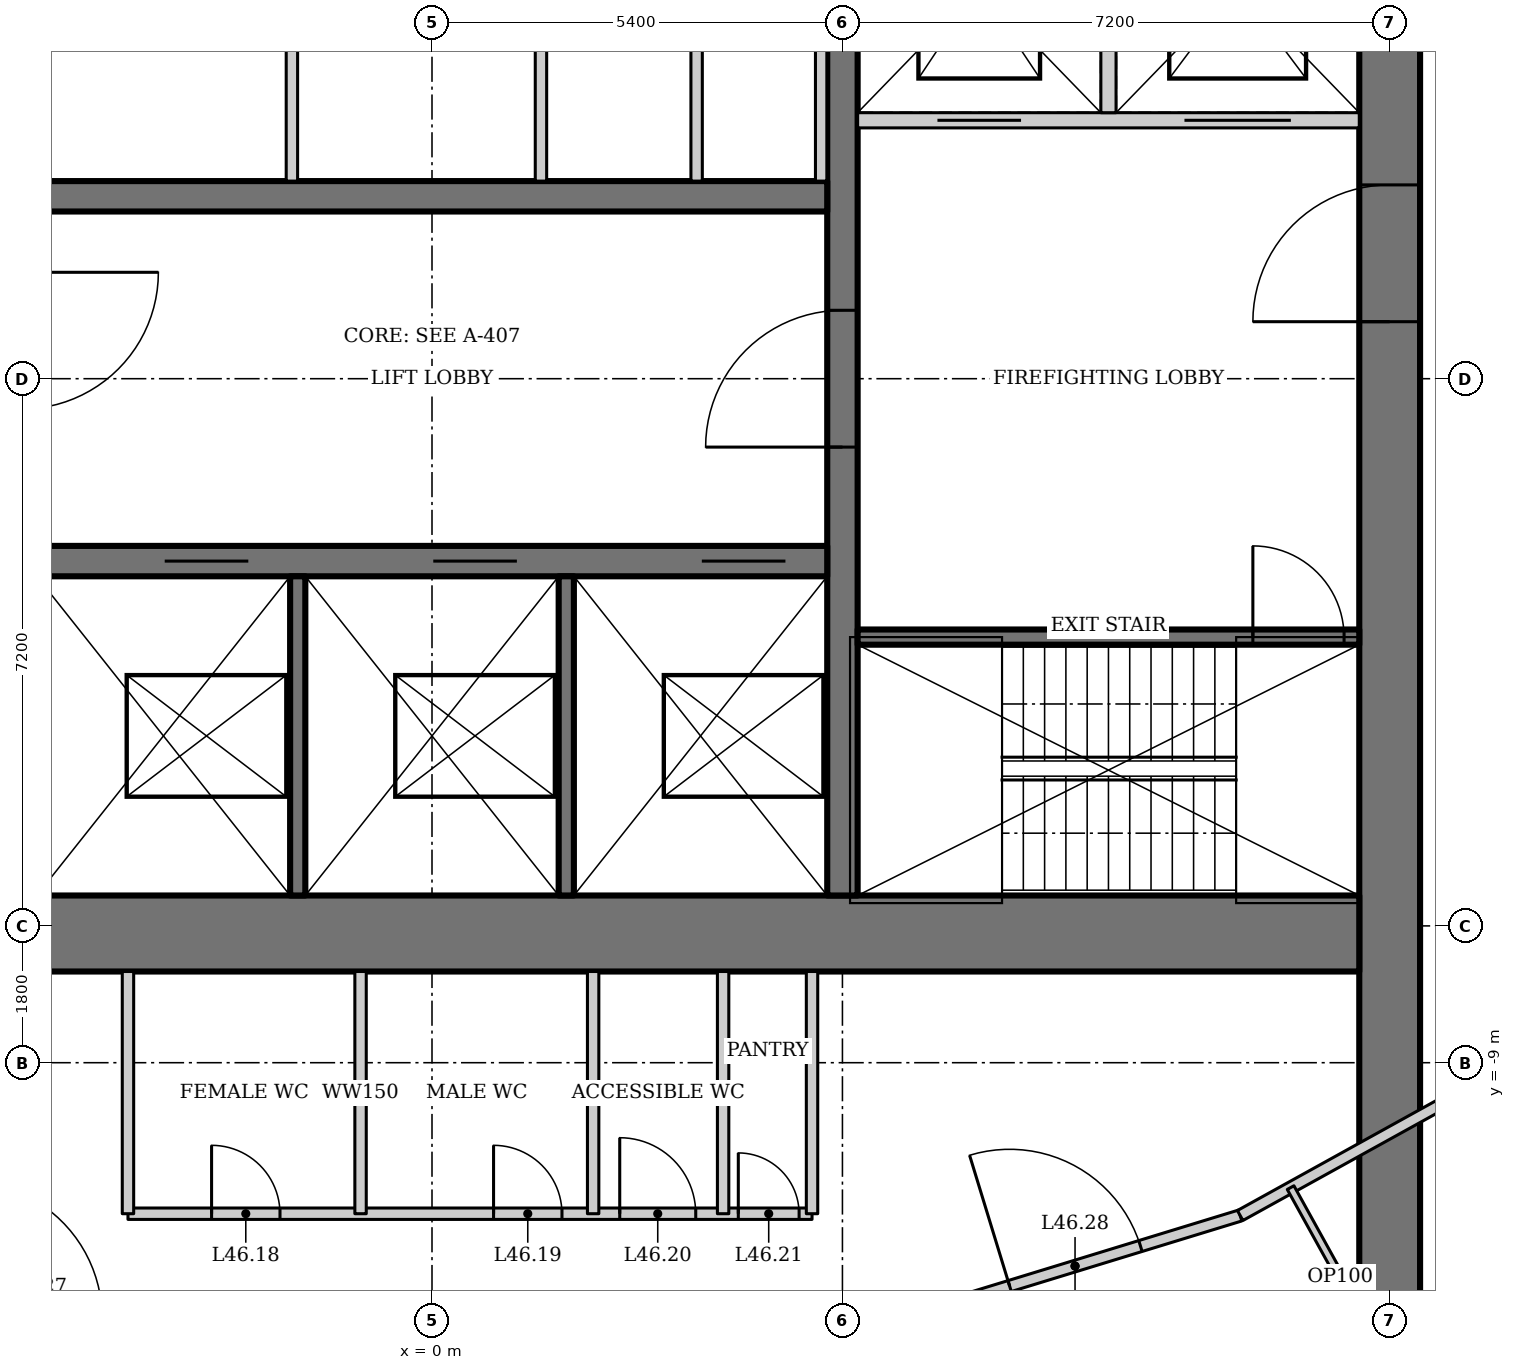
"""IFC4 building model, lengths in metres.
Left out: names, types, materials, properties, quantities, classifications, styles, units other than length and angle.
Written with IfcOpenShell. Run it as: python <this file> out.ifc"""

import sys

from ifc_helpers import new_model, si_unit, direction, frame, frame_2d, origin, place, context, subcontext, project, spatial, rectangle, extrude, element, fill, save


model = new_model("IFC4")
c1 = context("Model", 3, precision=1e-05, world=origin(), true_north=direction((0.0, 1.0)))
c2 = subcontext(c1, "Body", "Model", "MODEL_VIEW")
j1 = project(units=[si_unit("LENGTHUNIT", "METRE"), si_unit("PLANEANGLEUNIT", "RADIAN")], contexts=[c1])
p1 = place(None, origin())
s1 = spatial("IfcSite", under=j1, at=p1, CompositionType="ELEMENT")
p2 = place(p1, origin())
s2 = spatial("IfcBuilding", under=s1, at=p2, CompositionType="ELEMENT")
p3 = place(p2, frame((0.0, 0.0, 199.0)))
s3 = spatial("IfcBuildingStorey", under=s2, at=p3, CompositionType="ELEMENT", Elevation=199.0)
p4 = place(p3, frame((12.6, -13.0, 0.0), z_axis=(0.0, 0.0, 1.0), x_axis=(0.0, 1.0, 0.0)))
e1 = element("IfcWall", 1, at=p4, inside=s3, PredefinedType="SHEAR", context=c2, shape_type="SweptSolid", body=[
    extrude(rectangle(XDim=26.0, YDim=0.8, at=frame_2d((13.0, 0.0))), origin(), (0.0, 0.0, 1.0), 4.2),
])
p5 = place(p4, frame((13.75, 0.0, 0.0)))
e2 = element("IfcOpeningElement", 2, at=p5, cuts=e1, PredefinedType="OPENING", context=c2, shape_type="SweptSolid", body=[
    extrude(rectangle(XDim=1.8, YDim=2.1, at=frame_2d((0.9, 1.05))), frame((0.0, 0.41, 0.0), z_axis=(0.0, -1.0, 0.0), x_axis=(1.0, 0.0, 0.0)), (0.0, 0.0, 1.0), 0.82),
])
p6 = place(p3, frame((-12.2, -7.3, 0.0), z_axis=(0.0, 0.0, 1.0), x_axis=(1.0, 0.0, 0.0)))
e3 = element("IfcWall", 3, at=p6, inside=s3, PredefinedType="SHEAR", context=c2, shape_type="SweptSolid", body=[
    extrude(rectangle(XDim=24.4, YDim=1.0, at=frame_2d((12.2, 0.0))), origin(), (0.0, 0.0, 1.0), 4.2),
])
p7 = place(p3, frame((5.4, -6.8, 0.0), z_axis=(0.0, 0.0, 1.0), x_axis=(0.0, 1.0, 0.0)))
e4 = element("IfcWall", 4, at=p7, inside=s3, PredefinedType="SHEAR", context=c2, shape_type="SweptSolid", body=[
    extrude(rectangle(XDim=14.6, YDim=0.4, at=frame_2d((7.3, 0.0))), origin(), (0.0, 0.0, 1.0), 4.2),
])
p8 = place(p7, frame((5.9, 0.0, 0.0)))
e5 = element("IfcOpeningElement", 5, at=p8, cuts=e4, PredefinedType="OPENING", context=c2, shape_type="SweptSolid", body=[
    extrude(rectangle(XDim=1.8, YDim=2.1, at=frame_2d((0.9, 1.05))), frame((0.0, 0.21, 0.0), z_axis=(0.0, -1.0, 0.0), x_axis=(1.0, 0.0, 0.0)), (0.0, 0.0, 1.0), 0.42),
])
p9 = place(p3, frame((-5.2, -2.4, 0.0), z_axis=(0.0, 0.0, 1.0), x_axis=(1.0, 0.0, 0.0)))
e6 = element("IfcWall", 6, at=p9, inside=s3, PredefinedType="SHEAR", context=c2, shape_type="SweptSolid", body=[
    extrude(rectangle(XDim=10.4, YDim=0.4, at=frame_2d((5.2, 0.0))), origin(), (0.0, 0.0, 1.0), 4.2),
])
p10 = place(p9, frame((1.683, 0.0, 0.0)))
e7 = element("IfcOpeningElement", 7, at=p10, cuts=e6, PredefinedType="OPENING", context=c2, shape_type="SweptSolid", body=[
    extrude(rectangle(XDim=1.1, YDim=2.2, at=frame_2d((0.55, 1.1))), frame((0.0, 0.21, 0.0), z_axis=(0.0, -1.0, 0.0), x_axis=(1.0, 0.0, 0.0)), (0.0, 0.0, 1.0), 0.42),
])
p11 = place(p9, frame((5.217, 0.0, 0.0)))
e8 = element("IfcOpeningElement", 8, at=p11, cuts=e6, PredefinedType="OPENING", context=c2, shape_type="SweptSolid", body=[
    extrude(rectangle(XDim=1.1, YDim=2.2, at=frame_2d((0.55, 1.1))), frame((0.0, 0.21, 0.0), z_axis=(0.0, -1.0, 0.0), x_axis=(1.0, 0.0, 0.0)), (0.0, 0.0, 1.0), 0.42),
])
p12 = place(p9, frame((8.75, 0.0, 0.0)))
e9 = element("IfcOpeningElement", 9, at=p12, cuts=e6, PredefinedType="OPENING", context=c2, shape_type="SweptSolid", body=[
    extrude(rectangle(XDim=1.1, YDim=2.2, at=frame_2d((0.55, 1.1))), frame((0.0, 0.21, 0.0), z_axis=(0.0, -1.0, 0.0), x_axis=(1.0, 0.0, 0.0)), (0.0, 0.0, 1.0), 0.42),
])
for number, where, z_axis, x_axis in (
    (10, (-1.767, -2.6, 0.0), (0.0, 0.0, 1.0), (0.0, -1.0, 0.0)),
    (11, (1.767, -2.6, 0.0), (0.0, 0.0, 1.0), (0.0, -1.0, 0.0)),
):
    element("IfcWall", number, at=place(p3, frame(where, z_axis=z_axis, x_axis=x_axis)), inside=s3, PredefinedType="SOLIDWALL", context=c2, shape_type="SweptSolid", body=[
        extrude(rectangle(XDim=4.2, YDim=0.2, at=frame_2d((2.1, 0.0))), origin(), (0.0, 0.0, 1.0), 4.2),
    ])
p13 = place(p3, frame((5.2, 2.4, 0.0), z_axis=(0.0, 0.0, 1.0), x_axis=(-1.0, 0.0, 0.0)))
e12 = element("IfcWall", 12, at=p13, inside=s3, PredefinedType="SHEAR", context=c2, shape_type="SweptSolid", body=[
    extrude(rectangle(XDim=10.4, YDim=0.4, at=frame_2d((5.2, 0.0))), origin(), (0.0, 0.0, 1.0), 4.2),
])
p14 = place(p3, frame((5.6, -3.4, 0.0), z_axis=(0.0, 0.0, 1.0), x_axis=(1.0, 0.0, 0.0)))
e13 = element("IfcWall", 13, at=p14, inside=s3, PredefinedType="SHEAR", context=c2, shape_type="SweptSolid", body=[
    extrude(rectangle(XDim=6.6, YDim=0.2, at=frame_2d((3.3, 0.0))), origin(), (0.0, 0.0, 1.0), 4.2),
])
p15 = place(p14, frame((5.2, 0.0, 0.0)))
e14 = element("IfcOpeningElement", 14, at=p15, cuts=e13, PredefinedType="OPENING", context=c2, shape_type="SweptSolid", body=[
    extrude(rectangle(XDim=1.2, YDim=2.1, at=frame_2d((0.6, 1.05))), frame((0.0, 0.11, 0.0), z_axis=(0.0, -1.0, 0.0), x_axis=(1.0, 0.0, 0.0)), (0.0, 0.0, 1.0), 0.22),
])
p16 = place(p3, frame((12.2, 3.4, 0.0), z_axis=(0.0, 0.0, 1.0), x_axis=(-1.0, 0.0, 0.0)))
e15 = element("IfcWall", 15, at=p16, inside=s3, PredefinedType="SOLIDWALL", context=c2, shape_type="SweptSolid", body=[
    extrude(rectangle(XDim=6.6, YDim=0.2, at=frame_2d((3.3, 0.0))), origin(), (0.0, 0.0, 1.0), 4.2),
])
p17 = place(p16, frame((4.45, 0.0, 0.0)))
e16 = element("IfcOpeningElement", 16, at=p17, cuts=e15, PredefinedType="OPENING", context=c2, shape_type="SweptSolid", body=[
    extrude(rectangle(XDim=1.1, YDim=2.2, at=frame_2d((0.55, 1.1))), frame((0.0, 0.11, 0.0), z_axis=(0.0, -1.0, 0.0), x_axis=(1.0, 0.0, 0.0)), (0.0, 0.0, 1.0), 0.22),
])
p18 = place(p16, frame((0.9, 0.0, 0.0)))
e17 = element("IfcOpeningElement", 17, at=p18, cuts=e15, PredefinedType="OPENING", context=c2, shape_type="SweptSolid", body=[
    extrude(rectangle(XDim=1.4, YDim=2.2, at=frame_2d((0.7, 1.1))), frame((0.0, 0.11, 0.0), z_axis=(0.0, -1.0, 0.0), x_axis=(1.0, 0.0, 0.0)), (0.0, 0.0, 1.0), 0.22),
])
p19 = place(p3, frame((8.9, 3.5, 0.0), z_axis=(0.0, 0.0, 1.0), x_axis=(0.0, 1.0, 0.0)))
e18 = element("IfcWall", 18, at=p19, inside=s3, PredefinedType="SOLIDWALL", context=c2, shape_type="SweptSolid", body=[
    extrude(rectangle(XDim=3.3, YDim=0.2, at=frame_2d((1.65, 0.0))), origin(), (0.0, 0.0, 1.0), 4.2),
])
p20 = place(p3, frame((6.288, -12.341, 0.0), z_axis=(0.0, 0.0, 1.0), x_axis=(0.956185837153, 0.292760388079, 0.0)))
e19 = element("IfcWall", 19, at=p20, inside=s3, PredefinedType="PARTITIONING", context=c2, shape_type="SweptSolid", body=[
    extrude(rectangle(XDim=4.544, YDim=0.15, at=frame_2d((2.272, 0.0))), origin(), (0.0, 0.0, 1.0), 4.05),
])
p21 = place(p20, frame((1.372, 0.0, 0.0)))
e20 = element("IfcOpeningElement", 20, at=p21, cuts=e19, PredefinedType="OPENING", context=c2, shape_type="SweptSolid", body=[
    extrude(rectangle(XDim=1.8, YDim=2.1, at=frame_2d((0.9, 1.05))), frame((0.0, 0.085, 0.0), z_axis=(0.0, -1.0, 0.0), x_axis=(1.0, 0.0, 0.0)), (0.0, 0.0, 1.0), 0.17),
])
p22 = place(p3, frame((10.633, -11.01, 0.0), z_axis=(0.0, 0.0, 1.0), x_axis=(0.875044572696, 0.484042349176, 0.0)))
e21 = element("IfcWall", 21, at=p22, inside=s3, PredefinedType="PARTITIONING", context=c2, shape_type="SweptSolid", body=[
    extrude(rectangle(XDim=5.015, YDim=0.15, at=frame_2d((2.507, 0.0))), origin(), (0.0, 0.0, 1.0), 4.05),
])
for number, where, z_axis, x_axis in (
    (22, (5.12, 2.6, 0.0), (0.0, 0.0, 1.0), (0.0, 1.0, 0.0)),
    (23, (-1.843, 2.6, 0.0), (0.0, 0.0, 1.0), (0.0, 1.0, 0.0)),
):
    element("IfcWall", number, at=place(p3, frame(where, z_axis=z_axis, x_axis=x_axis)), inside=s3, PredefinedType="SOLIDWALL", context=c2, shape_type="SweptSolid", body=[
        extrude(rectangle(XDim=4.4, YDim=0.15, at=frame_2d((2.2, 0.0))), origin(), (0.0, 0.0, 1.0), 4.05),
    ])
p23 = place(p3, frame((1.434, 2.6, 0.0), z_axis=(0.0, 0.0, 1.0), x_axis=(0.0, 1.0, 0.0)))
e24 = element("IfcWall", 24, at=p23, inside=s3, PredefinedType="SOLIDWALL", context=c2, shape_type="SweptSolid", body=[
    extrude(rectangle(XDim=4.4, YDim=0.15, at=frame_2d((2.2, 0.0))), origin(), (0.0, 0.0, 1.0), 3.108),
])
p24 = place(p3, frame((3.482, 2.6, 0.0), z_axis=(0.0, 0.0, 1.0), x_axis=(0.0, 1.0, 0.0)))
e25 = element("IfcWall", 25, at=p24, inside=s3, PredefinedType="SOLIDWALL", context=c2, shape_type="SweptSolid", body=[
    extrude(rectangle(XDim=4.4, YDim=0.15, at=frame_2d((2.2, 0.0))), origin(), (0.0, 0.0, 1.0), 4.05),
])
p25 = place(p3, frame((-4.0, -10.987, 0.0), z_axis=(0.0, 0.0, 1.0), x_axis=(1.0, 0.0, 0.0)))
e26 = element("IfcWall", 26, at=p25, inside=s3, PredefinedType="SOLIDWALL", context=c2, shape_type="SweptSolid", body=[
    extrude(rectangle(XDim=9.0, YDim=0.15, at=frame_2d((4.5, 0.0))), origin(), (0.0, 0.0, 1.0), 4.05),
])
p26 = place(p25, frame((1.1, 0.0, 0.0)))
e27 = element("IfcOpeningElement", 27, at=p26, cuts=e26, PredefinedType="OPENING", context=c2, shape_type="SweptSolid", body=[
    extrude(rectangle(XDim=0.9, YDim=2.1, at=frame_2d((0.45, 1.05))), frame((0.0, 0.085, 0.0), z_axis=(0.0, -1.0, 0.0), x_axis=(1.0, 0.0, 0.0)), (0.0, 0.0, 1.0), 0.17),
])
p27 = place(p25, frame((4.81, 0.0, 0.0)))
e28 = element("IfcOpeningElement", 28, at=p27, cuts=e26, PredefinedType="OPENING", context=c2, shape_type="SweptSolid", body=[
    extrude(rectangle(XDim=0.9, YDim=2.1, at=frame_2d((0.45, 1.05))), frame((0.0, 0.085, 0.0), z_axis=(0.0, -1.0, 0.0), x_axis=(1.0, 0.0, 0.0)), (0.0, 0.0, 1.0), 0.17),
])
p28 = place(p25, frame((6.47, 0.0, 0.0)))
e29 = element("IfcOpeningElement", 29, at=p28, cuts=e26, PredefinedType="OPENING", context=c2, shape_type="SweptSolid", body=[
    extrude(rectangle(XDim=1.0, YDim=2.1, at=frame_2d((0.5, 1.05))), frame((0.0, 0.085, 0.0), z_axis=(0.0, -1.0, 0.0), x_axis=(1.0, 0.0, 0.0)), (0.0, 0.0, 1.0), 0.17),
])
p29 = place(p25, frame((8.03, 0.0, 0.0)))
e30 = element("IfcOpeningElement", 30, at=p29, cuts=e26, PredefinedType="OPENING", context=c2, shape_type="SweptSolid", body=[
    extrude(rectangle(XDim=0.8, YDim=2.1, at=frame_2d((0.4, 1.05))), frame((0.0, 0.085, 0.0), z_axis=(0.0, -1.0, 0.0), x_axis=(1.0, 0.0, 0.0)), (0.0, 0.0, 1.0), 0.17),
])
for number, where, z_axis, x_axis in (
    (31, (-4.0, -7.8, 0.0), (0.0, 0.0, 1.0), (0.0, -1.0, 0.0)),
    (32, (5.0, -7.8, 0.0), (0.0, 0.0, 1.0), (0.0, -1.0, 0.0)),
    (33, (-0.94, -7.8, 0.0), (0.0, 0.0, 1.0), (0.0, -1.0, 0.0)),
):
    element("IfcWall", number, at=place(p3, frame(where, z_axis=z_axis, x_axis=x_axis)), inside=s3, PredefinedType="SOLIDWALL", context=c2, shape_type="SweptSolid", body=[
        extrude(rectangle(XDim=3.187, YDim=0.15, at=frame_2d((1.594, 0.0))), origin(), (0.0, 0.0, 1.0), 4.05),
    ])
p30 = place(p3, frame((2.12, -7.8, 0.0), z_axis=(0.0, 0.0, 1.0), x_axis=(0.0, -1.0, 0.0)))
e34 = element("IfcWall", 34, at=p30, inside=s3, PredefinedType="SOLIDWALL", context=c2, shape_type="SweptSolid", body=[
    extrude(rectangle(XDim=3.187, YDim=0.15, at=frame_2d((1.594, 0.0))), origin(), (0.0, 0.0, 1.0), 3.293),
])
p31 = place(p3, frame((3.83, -7.8, 0.0), z_axis=(0.0, 0.0, 1.0), x_axis=(0.0, -1.0, 0.0)))
e35 = element("IfcWall", 35, at=p31, inside=s3, PredefinedType="SOLIDWALL", context=c2, shape_type="SweptSolid", body=[
    extrude(rectangle(XDim=3.187, YDim=0.15, at=frame_2d((1.594, 0.0))), origin(), (0.0, 0.0, 1.0), 4.05),
])
p32 = place(p3, frame((12.6, -13.0, 0.0), z_axis=(0.0, 0.0, 1.0), x_axis=(-0.484102737563, 0.875011165348, 0.0)))
e36 = element("IfcWall", 36, at=p32, inside=s3, PredefinedType="PARTITIONING", context=c2, shape_type="SweptSolid", body=[
    extrude(rectangle(XDim=2.693, YDim=0.1, at=frame_2d((1.347, 0.0))), origin(), (0.0, 0.0, 1.0), 4.05),
])
p33 = place(p8, origin())
e37 = element("IfcDoor", 37, at=p33, inside=s3, OperationType="DOUBLE_DOOR_DOUBLE_SWING", PredefinedType="DOOR", context=c2, shape_type="SweptSolid", body=[
    extrude(rectangle(XDim=1.8, YDim=2.1, at=frame_2d((0.9, 1.05))), frame((0.0, 0.025, 0.0), z_axis=(0.0, -1.0, 0.0), x_axis=(1.0, 0.0, 0.0)), (0.0, 0.0, 1.0), 0.05),
])
fill(e5, e37)
p34 = place(p15, origin())
e38 = element("IfcDoor", 38, at=p34, inside=s3, OperationType="SINGLE_SWING_RIGHT", PredefinedType="DOOR", context=c2, shape_type="SweptSolid", body=[
    extrude(rectangle(XDim=1.2, YDim=2.1, at=frame_2d((0.6, 1.05))), frame((0.0, 0.025, 0.0), z_axis=(0.0, -1.0, 0.0), x_axis=(1.0, 0.0, 0.0)), (0.0, 0.0, 1.0), 0.05),
])
fill(e14, e38)
p35 = place(p5, origin())
e39 = element("IfcDoor", 39, at=p35, inside=s3, OperationType="DOUBLE_DOOR_DOUBLE_SWING", PredefinedType="DOOR", context=c2, shape_type="SweptSolid", body=[
    extrude(rectangle(XDim=1.8, YDim=2.1, at=frame_2d((0.9, 1.05))), frame((0.0, 0.025, 0.0), z_axis=(0.0, -1.0, 0.0), x_axis=(1.0, 0.0, 0.0)), (0.0, 0.0, 1.0), 0.05),
])
fill(e2, e39)
p36 = place(p10, origin())
e40 = element("IfcDoor", 40, at=p36, inside=s3, OperationType="DOUBLE_DOOR_SLIDING", PredefinedType="DOOR", context=c2, shape_type="SweptSolid", body=[
    extrude(rectangle(XDim=1.1, YDim=2.2, at=frame_2d((0.55, 1.1))), frame((0.0, 0.025, 0.0), z_axis=(0.0, -1.0, 0.0), x_axis=(1.0, 0.0, 0.0)), (0.0, 0.0, 1.0), 0.05),
])
fill(e7, e40)
p37 = place(p11, origin())
e41 = element("IfcDoor", 41, at=p37, inside=s3, OperationType="DOUBLE_DOOR_SLIDING", PredefinedType="DOOR", context=c2, shape_type="SweptSolid", body=[
    extrude(rectangle(XDim=1.1, YDim=2.2, at=frame_2d((0.55, 1.1))), frame((0.0, 0.025, 0.0), z_axis=(0.0, -1.0, 0.0), x_axis=(1.0, 0.0, 0.0)), (0.0, 0.0, 1.0), 0.05),
])
fill(e8, e41)
p38 = place(p12, origin())
e42 = element("IfcDoor", 42, at=p38, inside=s3, OperationType="DOUBLE_DOOR_SLIDING", PredefinedType="DOOR", context=c2, shape_type="SweptSolid", body=[
    extrude(rectangle(XDim=1.1, YDim=2.2, at=frame_2d((0.55, 1.1))), frame((0.0, 0.025, 0.0), z_axis=(0.0, -1.0, 0.0), x_axis=(1.0, 0.0, 0.0)), (0.0, 0.0, 1.0), 0.05),
])
fill(e9, e42)
p39 = place(p17, origin())
e43 = element("IfcDoor", 43, at=p39, inside=s3, OperationType="DOUBLE_DOOR_SLIDING", PredefinedType="DOOR", context=c2, shape_type="SweptSolid", body=[
    extrude(rectangle(XDim=1.1, YDim=2.2, at=frame_2d((0.55, 1.1))), frame((0.0, 0.025, 0.0), z_axis=(0.0, -1.0, 0.0), x_axis=(1.0, 0.0, 0.0)), (0.0, 0.0, 1.0), 0.05),
])
fill(e16, e43)
p40 = place(p18, origin())
e44 = element("IfcDoor", 44, at=p40, inside=s3, OperationType="DOUBLE_DOOR_SLIDING", PredefinedType="DOOR", context=c2, shape_type="SweptSolid", body=[
    extrude(rectangle(XDim=1.4, YDim=2.2, at=frame_2d((0.7, 1.1))), frame((0.0, 0.025, 0.0), z_axis=(0.0, -1.0, 0.0), x_axis=(1.0, 0.0, 0.0)), (0.0, 0.0, 1.0), 0.05),
])
fill(e17, e44)
p41 = place(p26, origin())
e45 = element("IfcDoor", 45, at=p41, inside=s3, OperationType="SINGLE_SWING_LEFT", PredefinedType="DOOR", context=c2, shape_type="SweptSolid", body=[
    extrude(rectangle(XDim=0.9, YDim=2.1, at=frame_2d((0.45, 1.05))), frame((0.0, 0.025, 0.0), z_axis=(0.0, -1.0, 0.0), x_axis=(1.0, 0.0, 0.0)), (0.0, 0.0, 1.0), 0.05),
])
fill(e27, e45)
p42 = place(p27, origin())
e46 = element("IfcDoor", 46, at=p42, inside=s3, OperationType="SINGLE_SWING_LEFT", PredefinedType="DOOR", context=c2, shape_type="SweptSolid", body=[
    extrude(rectangle(XDim=0.9, YDim=2.1, at=frame_2d((0.45, 1.05))), frame((0.0, 0.025, 0.0), z_axis=(0.0, -1.0, 0.0), x_axis=(1.0, 0.0, 0.0)), (0.0, 0.0, 1.0), 0.05),
])
fill(e28, e46)
p43 = place(p28, origin())
e47 = element("IfcDoor", 47, at=p43, inside=s3, OperationType="SINGLE_SWING_LEFT", PredefinedType="DOOR", context=c2, shape_type="SweptSolid", body=[
    extrude(rectangle(XDim=1.0, YDim=2.1, at=frame_2d((0.5, 1.05))), frame((0.0, 0.025, 0.0), z_axis=(0.0, -1.0, 0.0), x_axis=(1.0, 0.0, 0.0)), (0.0, 0.0, 1.0), 0.05),
])
fill(e29, e47)
p44 = place(p29, origin())
e48 = element("IfcDoor", 48, at=p44, inside=s3, OperationType="SINGLE_SWING_LEFT", PredefinedType="DOOR", context=c2, shape_type="SweptSolid", body=[
    extrude(rectangle(XDim=0.8, YDim=2.1, at=frame_2d((0.4, 1.05))), frame((0.0, 0.025, 0.0), z_axis=(0.0, -1.0, 0.0), x_axis=(1.0, 0.0, 0.0)), (0.0, 0.0, 1.0), 0.05),
])
fill(e30, e48)
p45 = place(p21, origin())
e49 = element("IfcDoor", 49, at=p45, inside=s3, OperationType="DOUBLE_DOOR_DOUBLE_SWING", PredefinedType="DOOR", context=c2, shape_type="SweptSolid", body=[
    extrude(rectangle(XDim=1.8, YDim=2.1, at=frame_2d((0.9, 1.05))), frame((0.0, 0.025, 0.0), z_axis=(0.0, -1.0, 0.0), x_axis=(1.0, 0.0, 0.0)), (0.0, 0.0, 1.0), 0.05),
])
fill(e20, e49)
save(model, sys.argv[1])
